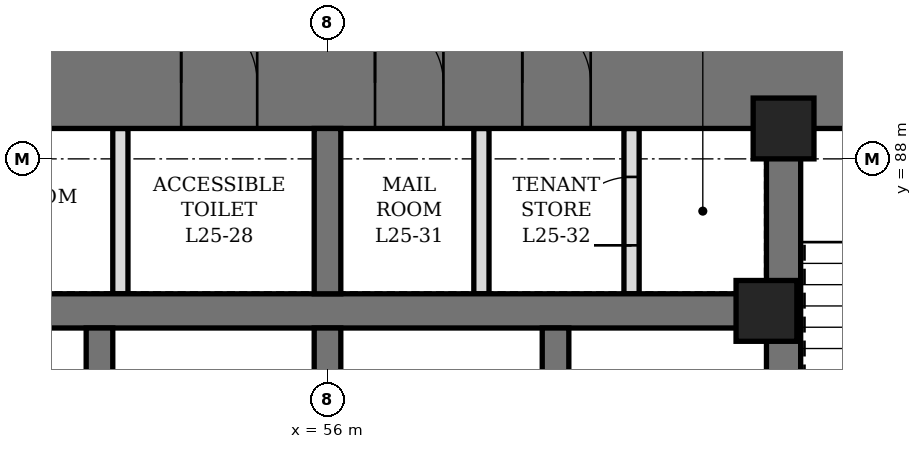
"""IFC4 building model, lengths in metres.
Left out: names, types, materials, properties, quantities, classifications, styles, units other than length and angle.
Written with IfcOpenShell. Run it as: python <this file> out.ifc"""

import sys

from ifc_helpers import new_model, si_unit, direction, frame, frame_2d, origin, origin_2d, place, context, subcontext, project, spatial, rectangle, hollow_rectangle, extrude, element, fill, save


model = new_model("IFC4")
c1 = context("Model", 3, precision=1e-05, world=origin(), true_north=direction((0.0, 1.0)))
c2 = subcontext(c1, "Body", "Model", "MODEL_VIEW")
j1 = project(units=[si_unit("LENGTHUNIT", "METRE"), si_unit("PLANEANGLEUNIT", "RADIAN")], contexts=[c1])
p1 = place(None, origin())
s1 = spatial("IfcSite", under=j1, at=p1, CompositionType="ELEMENT")
p2 = place(p1, origin())
s2 = spatial("IfcBuilding", under=s1, at=p2, CompositionType="ELEMENT")
p3 = place(p2, frame((0.0, 0.0, 116.5)))
s3 = spatial("IfcBuildingStorey", under=s2, at=p3, CompositionType="ELEMENT", Elevation=116.5)
p4 = place(p3, frame((44.6, 89.0, 0.0), z_axis=(0.0, 0.0, 1.0), x_axis=(1.0, 0.0, 0.0)))
e1 = element("IfcWall", 1, at=p4, inside=s3, PredefinedType="SHEAR", context=c2, shape_type="SweptSolid", body=[
    extrude(rectangle(XDim=22.8, YDim=1.2, at=frame_2d((11.4, 0.0))), origin(), (0.0, 0.0, 1.0), 4.2),
])
p5 = place(p4, frame((9.475, 0.0, 0.0)))
e2 = element("IfcOpeningElement", 2, at=p5, cuts=e1, PredefinedType="OPENING", context=c2, shape_type="SweptSolid", body=[
    extrude(rectangle(XDim=1.0, YDim=2.1, at=frame_2d((0.5, 1.05))), frame((0.0, 0.61, 0.0), z_axis=(0.0, -1.0, 0.0), x_axis=(1.0, 0.0, 0.0)), (0.0, 0.0, 1.0), 1.22),
])
p6 = place(p4, frame((6.65, 0.0, 0.0)))
e3 = element("IfcOpeningElement", 3, at=p6, cuts=e1, PredefinedType="OPENING", context=c2, shape_type="SweptSolid", body=[
    extrude(rectangle(XDim=0.9, YDim=2.1, at=frame_2d((0.45, 1.05))), frame((0.0, 0.61, 0.0), z_axis=(0.0, -1.0, 0.0), x_axis=(1.0, 0.0, 0.0)), (0.0, 0.0, 1.0), 1.22),
])
p7 = place(p4, frame((12.025, 0.0, 0.0)))
e4 = element("IfcOpeningElement", 4, at=p7, cuts=e1, PredefinedType="OPENING", context=c2, shape_type="SweptSolid", body=[
    extrude(rectangle(XDim=0.9, YDim=2.1, at=frame_2d((0.45, 1.05))), frame((0.0, 0.61, 0.0), z_axis=(0.0, -1.0, 0.0), x_axis=(1.0, 0.0, 0.0)), (0.0, 0.0, 1.0), 1.22),
])
p8 = place(p4, frame((13.962, 0.0, 0.0)))
e5 = element("IfcOpeningElement", 5, at=p8, cuts=e1, PredefinedType="OPENING", context=c2, shape_type="SweptSolid", body=[
    extrude(rectangle(XDim=0.9, YDim=2.1, at=frame_2d((0.45, 1.05))), frame((0.0, 0.61, 0.0), z_axis=(0.0, -1.0, 0.0), x_axis=(1.0, 0.0, 0.0)), (0.0, 0.0, 1.0), 1.22),
])
p9 = place(p3, frame((62.0, 71.6, 0.0), z_axis=(0.0, 0.0, 1.0), x_axis=(0.0, 1.0, 0.0)))
e6 = element("IfcWall", 6, at=p9, inside=s3, PredefinedType="SHEAR", context=c2, shape_type="SweptSolid", body=[
    extrude(rectangle(XDim=16.8, YDim=0.45, at=frame_2d((8.4, 0.0))), origin(), (0.0, 0.0, 1.0), 4.2),
])
p10 = place(p9, frame((7.5, 0.0, 0.0)))
e7 = element("IfcOpeningElement", 7, at=p10, cuts=e6, PredefinedType="OPENING", context=c2, shape_type="SweptSolid", body=[
    extrude(rectangle(XDim=1.8, YDim=2.4, at=frame_2d((0.9, 1.2))), frame((0.0, 0.235, 0.0), z_axis=(0.0, -1.0, 0.0), x_axis=(1.0, 0.0, 0.0)), (0.0, 0.0, 1.0), 0.47),
])
p11 = place(p3, frame((50.225, 86.0, 0.0), z_axis=(0.0, 0.0, 1.0), x_axis=(1.0, 0.0, 0.0)))
e8 = element("IfcWall", 8, at=p11, inside=s3, PredefinedType="SHEAR", context=c2, shape_type="SweptSolid", body=[
    extrude(rectangle(XDim=11.55, YDim=0.45, at=frame_2d((5.775, 0.0))), origin(), (0.0, 0.0, 1.0), 4.2),
])
for number, where, z_axis, x_axis in (
    (9, (53.0, 82.225, 0.0), (0.0, 0.0, 1.0), (0.0, 1.0, 0.0)),
    (10, (56.0, 82.225, 0.0), (0.0, 0.0, 1.0), (0.0, 1.0, 0.0)),
    (11, (59.0, 82.225, 0.0), (0.0, 0.0, 1.0), (0.0, 1.0, 0.0)),
):
    element("IfcWall", number, at=place(p3, frame(where, z_axis=z_axis, x_axis=x_axis)), inside=s3, PredefinedType="SHEAR", context=c2, shape_type="SweptSolid", body=[
        extrude(rectangle(XDim=3.55, YDim=0.35, at=frame_2d((1.775, 0.0))), origin(), (0.0, 0.0, 1.0), 4.2),
    ])
p12 = place(p3, frame((56.0, 86.225, 0.0), z_axis=(0.0, 0.0, 1.0), x_axis=(0.0, 1.0, 0.0)))
e12 = element("IfcWall", 12, at=p12, inside=s3, PredefinedType="SHEAR", context=c2, shape_type="SweptSolid", body=[
    extrude(rectangle(XDim=2.175, YDim=0.35, at=frame_2d((1.087, 0.0))), origin(), (0.0, 0.0, 1.0), 4.2),
])
for number, where, z_axis, x_axis in (
    (13, (61.775, 86.0, 0.0), (0.0, 0.0, 1.0), (1.0, 0.0, 0.0)),
    (14, (62.0, 88.4, 0.0), (0.0, 0.0, 1.0), (1.0, 0.0, 0.0)),
):
    element("IfcColumn", number, at=place(p3, frame(where, z_axis=z_axis, x_axis=x_axis)), inside=s3, PredefinedType="COLUMN", context=c2, shape_type="SweptSolid", body=[
        extrude(hollow_rectangle(XDim=0.8, YDim=0.8, WallThickness=0.1, at=origin_2d()), origin(), (0.0, 0.0, 1.0), 4.2),
    ])
p13 = place(p3, frame((53.275, 86.225, 0.0), z_axis=(0.0, 0.0, 1.0), x_axis=(0.0, 1.0, 0.0)))
e15 = element("IfcWall", 15, at=p13, inside=s3, PredefinedType="PARTITIONING", context=c2, shape_type="SweptSolid", body=[
    extrude(rectangle(XDim=2.175, YDim=0.2, at=frame_2d((1.087, 0.0))), origin(), (0.0, 0.0, 1.0), 4.04),
])
p14 = place(p3, frame((60.0, 86.225, 0.0), z_axis=(0.0, 0.0, 1.0), x_axis=(0.0, 1.0, 0.0)))
e16 = element("IfcWall", 16, at=p14, inside=s3, PredefinedType="PARTITIONING", context=c2, shape_type="SweptSolid", body=[
    extrude(rectangle(XDim=2.175, YDim=0.2, at=frame_2d((1.087, 0.0))), origin(), (0.0, 0.0, 1.0), 4.04),
])
p15 = place(p14, frame((0.637, 0.0, 0.0)))
e17 = element("IfcOpeningElement", 17, at=p15, cuts=e16, PredefinedType="OPENING", context=c2, shape_type="SweptSolid", body=[
    extrude(rectangle(XDim=0.9, YDim=2.1, at=frame_2d((0.45, 1.05))), frame((0.0, 0.11, 0.0), z_axis=(0.0, -1.0, 0.0), x_axis=(1.0, 0.0, 0.0)), (0.0, 0.0, 1.0), 0.22),
])
p16 = place(p3, frame((58.025, 86.225, 0.0), z_axis=(0.0, 0.0, 1.0), x_axis=(0.0, 1.0, 0.0)))
e18 = element("IfcWall", 18, at=p16, inside=s3, PredefinedType="PARTITIONING", context=c2, shape_type="SweptSolid", body=[
    extrude(rectangle(XDim=2.175, YDim=0.2, at=frame_2d((1.087, 0.0))), origin(), (0.0, 0.0, 1.0), 4.04),
])
p17 = place(p5, origin())
e19 = element("IfcDoor", 19, at=p17, inside=s3, OperationType="SINGLE_SWING_LEFT", PredefinedType="DOOR", context=c2, shape_type="SweptSolid", body=[
    extrude(rectangle(XDim=1.0, YDim=2.1, at=frame_2d((0.5, 1.05))), frame((0.0, 0.35, 0.0), z_axis=(0.0, -1.0, 0.0), x_axis=(1.0, 0.0, 0.0)), (0.0, 0.0, 1.0), 0.7),
])
fill(e2, e19)
p18 = place(p7, origin())
e20 = element("IfcDoor", 20, at=p18, inside=s3, OperationType="SINGLE_SWING_LEFT", PredefinedType="DOOR", context=c2, shape_type="SweptSolid", body=[
    extrude(rectangle(XDim=0.9, YDim=2.1, at=frame_2d((0.45, 1.05))), frame((0.0, 0.35, 0.0), z_axis=(0.0, -1.0, 0.0), x_axis=(1.0, 0.0, 0.0)), (0.0, 0.0, 1.0), 0.7),
])
fill(e4, e20)
p19 = place(p8, origin())
e21 = element("IfcDoor", 21, at=p19, inside=s3, OperationType="SINGLE_SWING_LEFT", PredefinedType="DOOR", context=c2, shape_type="SweptSolid", body=[
    extrude(rectangle(XDim=0.9, YDim=2.1, at=frame_2d((0.45, 1.05))), frame((0.0, 0.35, 0.0), z_axis=(0.0, -1.0, 0.0), x_axis=(1.0, 0.0, 0.0)), (0.0, 0.0, 1.0), 0.7),
])
fill(e5, e21)
p20 = place(p15, origin())
e22 = element("IfcDoor", 22, at=p20, inside=s3, OperationType="SINGLE_SWING_LEFT", PredefinedType="DOOR", context=c2, shape_type="SweptSolid", body=[
    extrude(rectangle(XDim=0.9, YDim=2.1, at=frame_2d((0.45, 1.05))), frame((0.0, 0.1, 0.0), z_axis=(0.0, -1.0, 0.0), x_axis=(1.0, 0.0, 0.0)), (0.0, 0.0, 1.0), 0.199),
])
fill(e17, e22)
save(model, sys.argv[1])
